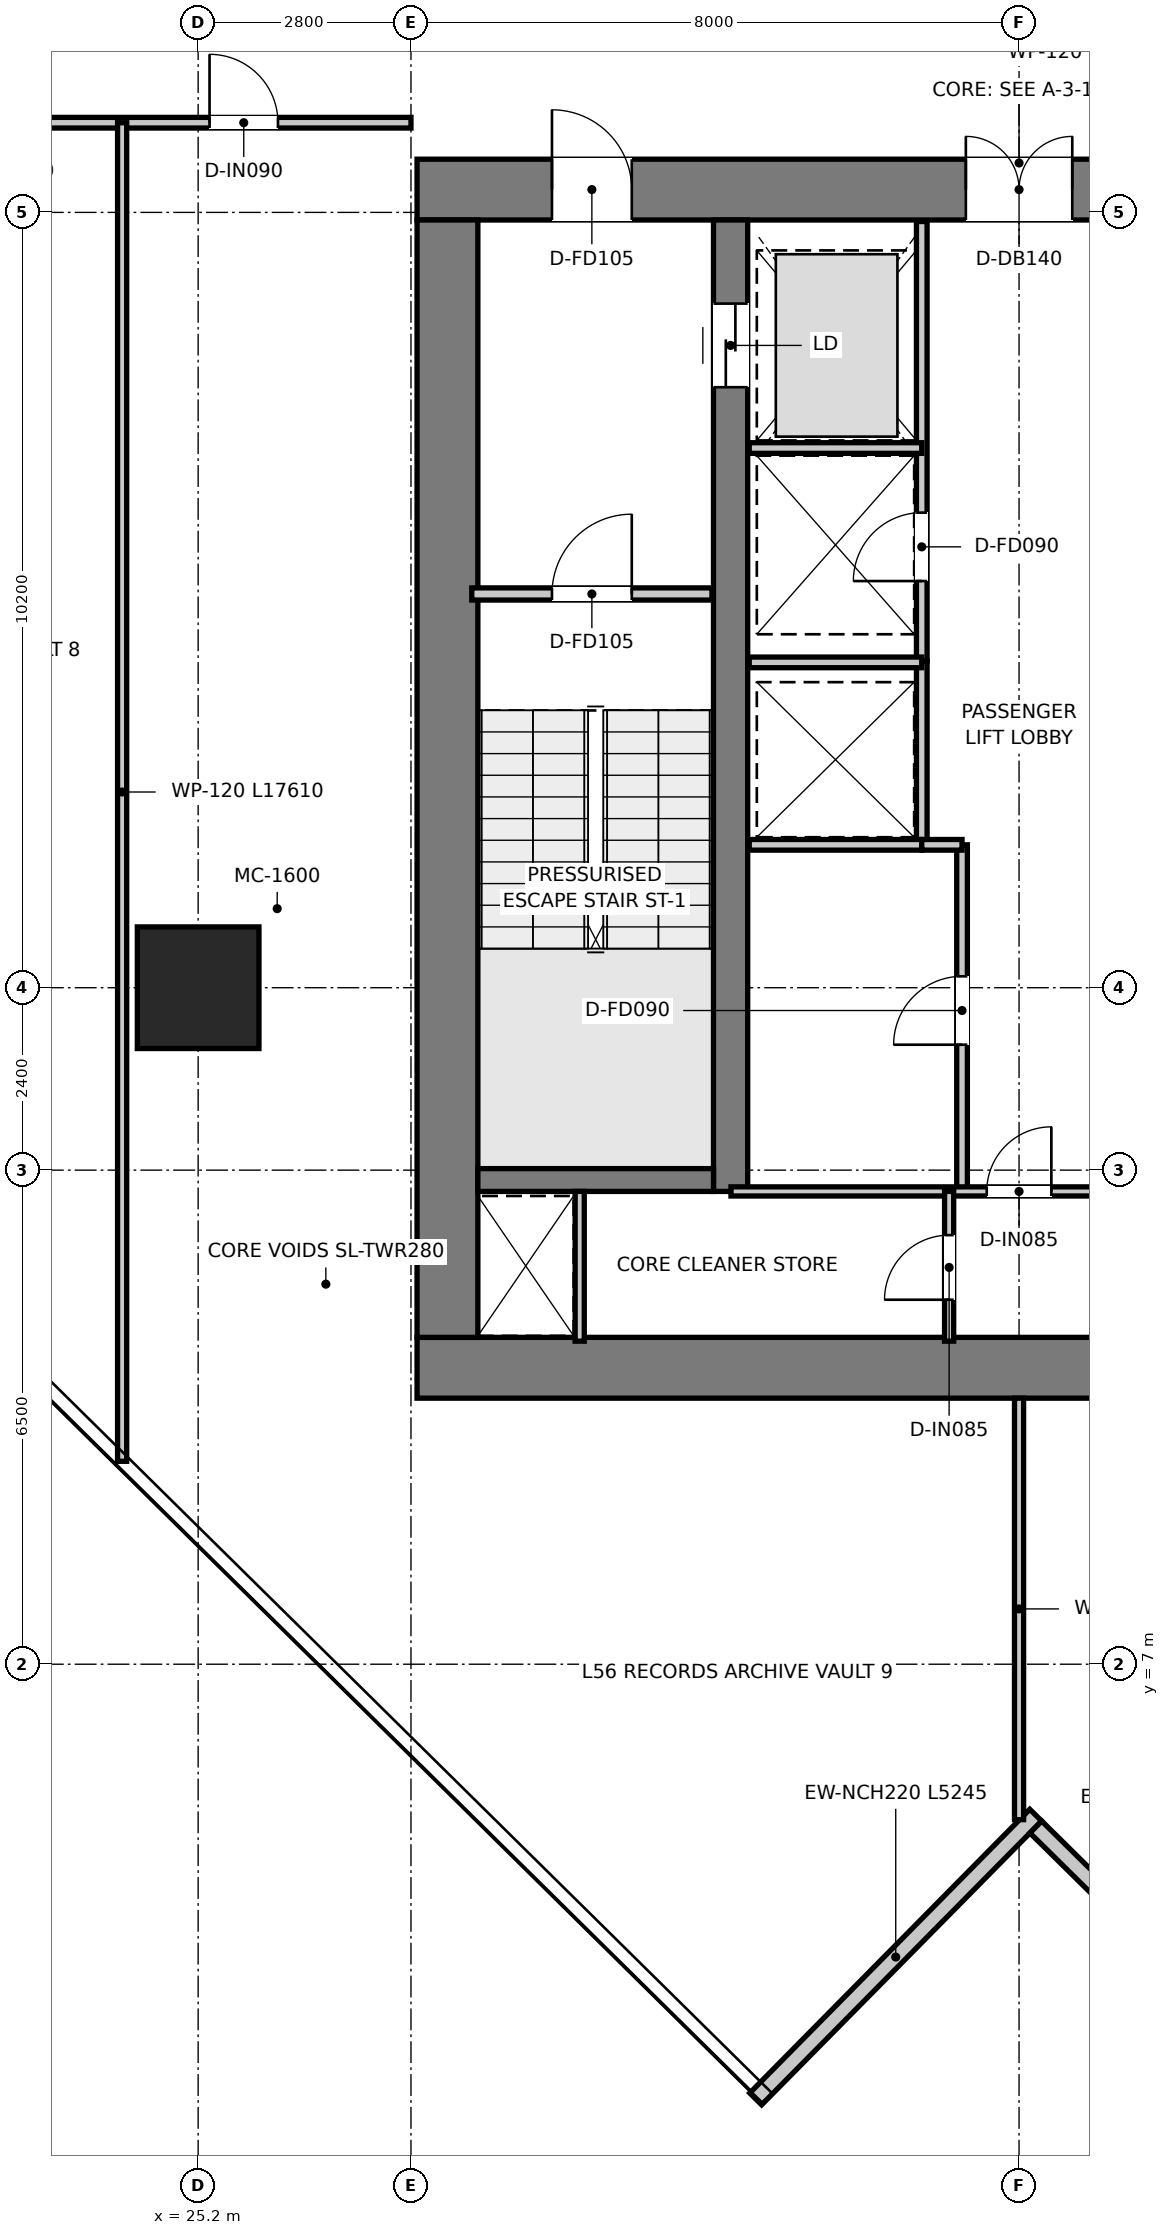
"""IFC4 building model, lengths in metres.
Left out: names, types, materials, properties, quantities, classifications, styles, units other than length and angle.
Written with IfcOpenShell. Run it as: python <this file> out.ifc"""

import sys

from ifc_helpers import new_model, si_unit, direction, frame, frame_2d, origin, origin_2d, place, context, subcontext, project, spatial, rectangle, extrude, source, transform, mapped, element, fill, save


model = new_model("IFC4")
c1 = context("Model", 3, precision=1e-05, world=origin(), true_north=direction((0.0, 1.0)))
c2 = subcontext(c1, "Body", "Model", "MODEL_VIEW")
j1 = project(units=[si_unit("LENGTHUNIT", "METRE"), si_unit("PLANEANGLEUNIT", "RADIAN")], contexts=[c1])
p1 = place(None, origin())
s1 = spatial("IfcSite", under=j1, at=p1, CompositionType="ELEMENT")
p2 = place(p1, origin())
s2 = spatial("IfcBuilding", under=s1, at=p2, CompositionType="ELEMENT")
p3 = place(p2, frame((0.0, 0.0, 231.0)))
s3 = spatial("IfcBuildingStorey", under=s2, at=p3, CompositionType="ELEMENT", Elevation=231.0)
p4 = place(p3, frame((28.08, 10.9, 0.0), z_axis=(0.0, 0.0, 1.0), x_axis=(1.0, 0.0, 0.0)))
e1 = element("IfcWall", 1, at=p4, inside=s3, PredefinedType="SHEAR", context=c2, shape_type="SweptSolid", body=[
    extrude(rectangle(XDim=15.84, YDim=0.8, at=frame_2d((7.92, 0.0))), origin(), (0.0, 0.0, 1.0), 3.95),
])
p5 = place(p3, frame((28.08, 26.4, 0.0), z_axis=(0.0, 0.0, 1.0), x_axis=(1.0, 0.0, 0.0)))
e2 = element("IfcWall", 2, at=p5, inside=s3, PredefinedType="SHEAR", context=c2, shape_type="SweptSolid", body=[
    extrude(rectangle(XDim=15.84, YDim=0.8, at=frame_2d((7.92, 0.0))), origin(), (0.0, 0.0, 1.0), 3.95),
])
p6 = place(p5, frame((7.22, 0.0, 0.0)))
e3 = element("IfcOpeningElement", 3, at=p6, cuts=e2, PredefinedType="OPENING", context=c2, shape_type="SweptSolid", body=[
    extrude(rectangle(XDim=1.4, YDim=2.2, at=frame_2d((0.7, 1.1))), frame((0.0, 0.41, 0.0), z_axis=(0.0, -1.0, 0.0), x_axis=(1.0, 0.0, 0.0)), (0.0, 0.0, 1.0), 0.82),
])
p7 = place(p5, frame((1.775, 0.0, 0.0)))
e4 = element("IfcOpeningElement", 4, at=p7, cuts=e2, PredefinedType="OPENING", context=c2, shape_type="SweptSolid", body=[
    extrude(rectangle(XDim=1.05, YDim=2.1, at=frame_2d((0.525, 1.05))), frame((0.0, 0.41, 0.0), z_axis=(0.0, -1.0, 0.0), x_axis=(1.0, 0.0, 0.0)), (0.0, 0.0, 1.0), 0.82),
])
p8 = place(p5, frame((13.015, 0.0, 0.0)))
e5 = element("IfcOpeningElement", 5, at=p8, cuts=e2, PredefinedType="OPENING", context=c2, shape_type="SweptSolid", body=[
    extrude(rectangle(XDim=1.05, YDim=2.1, at=frame_2d((0.525, 1.05))), frame((0.0, 0.41, 0.0), z_axis=(0.0, -1.0, 0.0), x_axis=(1.0, 0.0, 0.0)), (0.0, 0.0, 1.0), 0.82),
])
p9 = place(p3, frame((28.48, 11.3, 0.0), z_axis=(0.0, 0.0, 1.0), x_axis=(0.0, 1.0, 0.0)))
e6 = element("IfcWall", 6, at=p9, inside=s3, PredefinedType="SHEAR", context=c2, shape_type="SweptSolid", body=[
    extrude(rectangle(XDim=14.7, YDim=0.8, at=frame_2d((7.35, 0.0))), origin(), (0.0, 0.0, 1.0), 3.95),
])
p10 = place(p3, frame((32.205, 13.22, 0.0), z_axis=(0.0, 0.0, 1.0), x_axis=(0.0, 1.0, 0.0)))
e7 = element("IfcWall", 7, at=p10, inside=s3, PredefinedType="SHEAR", context=c2, shape_type="SweptSolid", body=[
    extrude(rectangle(XDim=12.78, YDim=0.45, at=frame_2d((6.39, 0.0))), origin(), (0.0, 0.0, 1.0), 3.95),
])
p11 = place(p10, frame((10.58, 0.0, 0.0)))
e8 = element("IfcOpeningElement", 8, at=p11, cuts=e7, PredefinedType="OPENING", context=c2, shape_type="SweptSolid", body=[
    extrude(rectangle(XDim=1.1, YDim=2.15, at=frame_2d((0.55, 1.075))), frame((0.0, 0.235, 0.0), z_axis=(0.0, -1.0, 0.0), x_axis=(1.0, 0.0, 0.0)), (0.0, 0.0, 1.0), 0.47),
])
p12 = place(p3, frame((28.88, 13.37, 0.0), z_axis=(0.0, 0.0, 1.0), x_axis=(1.0, 0.0, 0.0)))
e9 = element("IfcWall", 9, at=p12, inside=s3, PredefinedType="SHEAR", context=c2, shape_type="SweptSolid", body=[
    extrude(rectangle(XDim=3.1, YDim=0.3, at=frame_2d((1.55, 0.0))), origin(), (0.0, 0.0, 1.0), 3.95),
])
m1 = source(origin(), c2, "Body", "SweptSolid", [
    extrude(rectangle(XDim=1.6, YDim=1.6, at=origin_2d()), origin(), (0.0, 0.0, 1.0), 3.95),
])
p13 = place(p3, frame((25.2, 15.9, 0.0), z_axis=(0.0, 0.0, 1.0), x_axis=(1.0, 0.0, 0.0)))
e10 = element("IfcColumn", 10, at=p13, inside=s3, PredefinedType="USERDEFINED", context=c2, shape_type="MappedRepresentation", body=[
    mapped(m1, transform((0.0, 0.0, 0.0), x_axis=(1.0, 0.0, 0.0), y_axis=(0.0, 1.0, 0.0), z_axis=(0.0, 0.0, 1.0), scale=1.0)),
])
p14 = place(p3, frame((32.535, 1.281, 0.0), z_axis=(0.0, 0.0, 1.0), x_axis=(0.702460059039, 0.711723166305, 0.0)))
e11 = element("IfcWall", 11, at=p14, inside=s3, PredefinedType="ELEMENTEDWALL", context=c2, shape_type="SweptSolid", body=[
    extrude(rectangle(XDim=5.245, YDim=0.22, at=frame_2d((2.623, 0.0))), origin(), (0.0, 0.0, 1.0), 3.67),
])
p15 = place(p3, frame((36.221, 4.858, 0.0), z_axis=(0.0, 0.0, 1.0), x_axis=(0.711731489292, -0.702451626199, 0.0)))
e12 = element("IfcWall", 12, at=p15, inside=s3, PredefinedType="ELEMENTEDWALL", context=c2, shape_type="SweptSolid", body=[
    extrude(rectangle(XDim=5.025, YDim=0.22, at=frame_2d((2.512, 0.0))), origin(), (0.0, 0.0, 1.0), 3.67),
])
p16 = place(p3, frame((28.8, 21.08, 0.0), z_axis=(0.0, 0.0, 1.0), x_axis=(1.0, 0.0, 0.0)))
e13 = element("IfcWall", 13, at=p16, inside=s3, PredefinedType="PARTITIONING", context=c2, shape_type="SweptSolid", body=[
    extrude(rectangle(XDim=3.16, YDim=0.16, at=frame_2d((1.58, 0.0))), origin(), (0.0, 0.0, 1.0), 3.67),
])
p17 = place(p16, frame((1.055, 0.0, 0.0)))
e14 = element("IfcOpeningElement", 14, at=p17, cuts=e13, PredefinedType="OPENING", context=c2, shape_type="SweptSolid", body=[
    extrude(rectangle(XDim=1.05, YDim=2.1, at=frame_2d((0.525, 1.05))), frame((0.0, 0.09, 0.0), z_axis=(0.0, -1.0, 0.0), x_axis=(1.0, 0.0, 0.0)), (0.0, 0.0, 1.0), 0.18),
])
p18 = place(p3, frame((34.72, 20.2, 0.0), z_axis=(0.0, 0.0, 1.0), x_axis=(0.0, 1.0, 0.0)))
e15 = element("IfcWall", 15, at=p18, inside=s3, PredefinedType="PARTITIONING", context=c2, shape_type="SweptSolid", body=[
    extrude(rectangle(XDim=5.78, YDim=0.14, at=frame_2d((2.89, 0.0))), origin(), (0.0, 0.0, 1.0), 2.67),
])
p19 = place(p18, frame((1.05, 0.0, 0.0)))
e16 = element("IfcOpeningElement", 16, at=p19, cuts=e15, PredefinedType="OPENING", context=c2, shape_type="SweptSolid", body=[
    extrude(rectangle(XDim=0.9, YDim=2.1, at=frame_2d((0.45, 1.05))), frame((0.0, 0.08, 0.0), z_axis=(0.0, -1.0, 0.0), x_axis=(1.0, 0.0, 0.0)), (0.0, 0.0, 1.0), 0.16),
])
p20 = place(p3, frame((32.45, 23.0, 0.0), z_axis=(0.0, 0.0, 1.0), x_axis=(1.0, 0.0, 0.0)))
e17 = element("IfcWall", 17, at=p20, inside=s3, PredefinedType="PARTITIONING", context=c2, shape_type="SweptSolid", body=[
    extrude(rectangle(XDim=2.27, YDim=0.14, at=frame_2d((1.135, 0.0))), origin(), (0.0, 0.0, 1.0), 2.67),
])
p21 = place(p3, frame((34.72, 17.78, 0.0), z_axis=(0.0, 0.0, 1.0), x_axis=(0.0, 1.0, 0.0)))
e18 = element("IfcWall", 18, at=p21, inside=s3, PredefinedType="PARTITIONING", context=c2, shape_type="SweptSolid", body=[
    extrude(rectangle(XDim=2.42, YDim=0.14, at=frame_2d((1.21, 0.0))), origin(), (0.0, 0.0, 1.0), 3.67),
])
for number, where, z_axis, x_axis in (
    (19, (32.45, 17.78, 0.0), (0.0, 0.0, 1.0), (1.0, 0.0, 0.0)),
    (20, (32.45, 20.18, 0.0), (0.0, 0.0, 1.0), (1.0, 0.0, 0.0)),
):
    element("IfcWall", number, at=place(p3, frame(where, z_axis=z_axis, x_axis=x_axis)), inside=s3, PredefinedType="PARTITIONING", context=c2, shape_type="SweptSolid", body=[
        extrude(rectangle(XDim=2.27, YDim=0.14, at=frame_2d((1.135, 0.0))), origin(), (0.0, 0.0, 1.0), 3.67),
    ])
p22 = place(p3, frame((35.25, 13.22, 0.0), z_axis=(0.0, 0.0, 1.0), x_axis=(0.0, 1.0, 0.0)))
e21 = element("IfcWall", 21, at=p22, inside=s3, PredefinedType="PARTITIONING", context=c2, shape_type="SweptSolid", body=[
    extrude(rectangle(XDim=4.56, YDim=0.14, at=frame_2d((2.28, 0.0))), origin(), (0.0, 0.0, 1.0), 3.67),
])
p23 = place(p22, frame((1.93, 0.0, 0.0)))
e22 = element("IfcOpeningElement", 22, at=p23, cuts=e21, PredefinedType="OPENING", context=c2, shape_type="SweptSolid", body=[
    extrude(rectangle(XDim=0.9, YDim=2.1, at=frame_2d((0.45, 1.05))), frame((0.0, 0.08, 0.0), z_axis=(0.0, -1.0, 0.0), x_axis=(1.0, 0.0, 0.0)), (0.0, 0.0, 1.0), 0.16),
])
p24 = place(p3, frame((34.72, 17.78, 0.0), z_axis=(0.0, 0.0, 1.0), x_axis=(1.0, 0.0, 0.0)))
e23 = element("IfcWall", 23, at=p24, inside=s3, PredefinedType="PARTITIONING", context=c2, shape_type="SweptSolid", body=[
    extrude(rectangle(XDim=0.53, YDim=0.14, at=frame_2d((0.265, 0.0))), origin(), (0.0, 0.0, 1.0), 3.67),
])
p25 = place(p3, frame((30.22, 11.25, 0.0), z_axis=(0.0, 0.0, 1.0), x_axis=(0.0, 1.0, 0.0)))
e24 = element("IfcWall", 24, at=p25, inside=s3, PredefinedType="PARTITIONING", context=c2, shape_type="SweptSolid", body=[
    extrude(rectangle(XDim=1.97, YDim=0.12, at=frame_2d((0.985, 0.0))), origin(), (0.0, 0.0, 1.0), 3.67),
])
p26 = place(p3, frame((32.21, 13.22, 0.0), z_axis=(0.0, 0.0, 1.0), x_axis=(1.0, 0.0, 0.0)))
e25 = element("IfcWall", 25, at=p26, inside=s3, PredefinedType="PARTITIONING", context=c2, shape_type="SweptSolid", body=[
    extrude(rectangle(XDim=7.58, YDim=0.12, at=frame_2d((3.79, 0.0))), origin(), (0.0, 0.0, 1.0), 3.67),
])
p27 = place(p26, frame((3.365, 0.0, 0.0)))
e26 = element("IfcOpeningElement", 26, at=p27, cuts=e25, PredefinedType="OPENING", context=c2, shape_type="SweptSolid", body=[
    extrude(rectangle(XDim=0.85, YDim=2.1, at=frame_2d((0.425, 1.05))), frame((0.0, 0.07, 0.0), z_axis=(0.0, -1.0, 0.0), x_axis=(1.0, 0.0, 0.0)), (0.0, 0.0, 1.0), 0.14),
])
p28 = place(p3, frame((35.08, 11.25, 0.0), z_axis=(0.0, 0.0, 1.0), x_axis=(0.0, 1.0, 0.0)))
e27 = element("IfcWall", 27, at=p28, inside=s3, PredefinedType="PARTITIONING", context=c2, shape_type="SweptSolid", body=[
    extrude(rectangle(XDim=1.97, YDim=0.12, at=frame_2d((0.985, 0.0))), origin(), (0.0, 0.0, 1.0), 3.67),
])
p29 = place(p28, frame((0.545, 0.0, 0.0)))
e28 = element("IfcOpeningElement", 28, at=p29, cuts=e27, PredefinedType="OPENING", context=c2, shape_type="SweptSolid", body=[
    extrude(rectangle(XDim=0.85, YDim=2.1, at=frame_2d((0.425, 1.05))), frame((0.0, 0.07, 0.0), z_axis=(0.0, -1.0, 0.0), x_axis=(1.0, 0.0, 0.0)), (0.0, 0.0, 1.0), 0.14),
])
p30 = place(p3, frame((13.667, 27.28, 0.0), z_axis=(0.0, 0.0, 1.0), x_axis=(1.0, 0.0, 0.0)))
e29 = element("IfcWall", 29, at=p30, inside=s3, PredefinedType="PARTITIONING", context=c2, shape_type="SweptSolid", body=[
    extrude(rectangle(XDim=14.333, YDim=0.14, at=frame_2d((7.166, 0.0))), origin(), (0.0, 0.0, 1.0), 3.03),
])
p31 = place(p30, frame((1.198, 0.0, 0.0)))
e30 = element("IfcOpeningElement", 30, at=p31, cuts=e29, PredefinedType="OPENING", context=c2, shape_type="SweptSolid", body=[
    extrude(rectangle(XDim=0.9, YDim=2.1, at=frame_2d((0.45, 1.05))), frame((0.0, 0.08, 0.0), z_axis=(0.0, -1.0, 0.0), x_axis=(1.0, 0.0, 0.0)), (0.0, 0.0, 1.0), 0.16),
])
p32 = place(p30, frame((8.683, 0.0, 0.0)))
e31 = element("IfcOpeningElement", 31, at=p32, cuts=e29, PredefinedType="OPENING", context=c2, shape_type="SweptSolid", body=[
    extrude(rectangle(XDim=0.9, YDim=2.1, at=frame_2d((0.45, 1.05))), frame((0.0, 0.08, 0.0), z_axis=(0.0, -1.0, 0.0), x_axis=(1.0, 0.0, 0.0)), (0.0, 0.0, 1.0), 0.16),
])
p33 = place(p30, frame((11.683, 0.0, 0.0)))
e32 = element("IfcOpeningElement", 32, at=p33, cuts=e29, PredefinedType="OPENING", context=c2, shape_type="SweptSolid", body=[
    extrude(rectangle(XDim=0.9, YDim=2.1, at=frame_2d((0.45, 1.05))), frame((0.0, 0.08, 0.0), z_axis=(0.0, -1.0, 0.0), x_axis=(1.0, 0.0, 0.0)), (0.0, 0.0, 1.0), 0.16),
])
p34 = place(p3, frame((36.0, 4.955, 0.0), z_axis=(0.0, 0.0, 1.0), x_axis=(0.0, 1.0, 0.0)))
e33 = element("IfcWall", 33, at=p34, inside=s3, PredefinedType="PARTITIONING", context=c2, shape_type="SweptSolid", body=[
    extrude(rectangle(XDim=5.545, YDim=0.12, at=frame_2d((2.772, 0.0))), origin(), (0.0, 0.0, 1.0), 3.67),
])
p35 = place(p3, frame((24.2, 9.669, 0.0), z_axis=(0.0, 0.0, 1.0), x_axis=(0.0, 1.0, 0.0)))
e34 = element("IfcWall", 34, at=p35, inside=s3, PredefinedType="PARTITIONING", context=c2, shape_type="SweptSolid", body=[
    extrude(rectangle(XDim=17.611, YDim=0.12, at=frame_2d((8.805, 0.0))), origin(), (0.0, 0.0, 1.0), 3.18),
])
p36 = place(p17, origin())
e35 = element("IfcDoor", 35, at=p36, inside=s3, OperationType="SINGLE_SWING_RIGHT", PredefinedType="DOOR", context=c2, shape_type="SweptSolid", body=[
    extrude(rectangle(XDim=1.05, YDim=2.1, at=frame_2d((0.525, 1.05))), frame((0.0, 0.025, 0.0), z_axis=(0.0, -1.0, 0.0), x_axis=(1.0, 0.0, 0.0)), (0.0, 0.0, 1.0), 0.05),
])
fill(e14, e35)
p37 = place(p6, origin())
e36 = element("IfcDoor", 36, at=p37, inside=s3, OperationType="DOUBLE_DOOR_SINGLE_SWING", PredefinedType="DOOR", context=c2, shape_type="SweptSolid", body=[
    extrude(rectangle(XDim=1.4, YDim=2.2, at=frame_2d((0.7, 1.1))), frame((0.0, 0.025, 0.0), z_axis=(0.0, -1.0, 0.0), x_axis=(1.0, 0.0, 0.0)), (0.0, 0.0, 1.0), 0.05),
])
fill(e3, e36)
p38 = place(p7, origin())
e37 = element("IfcDoor", 37, at=p38, inside=s3, OperationType="SINGLE_SWING_LEFT", PredefinedType="DOOR", context=c2, shape_type="SweptSolid", body=[
    extrude(rectangle(XDim=1.05, YDim=2.1, at=frame_2d((0.525, 1.05))), frame((0.0, 0.025, 0.0), z_axis=(0.0, -1.0, 0.0), x_axis=(1.0, 0.0, 0.0)), (0.0, 0.0, 1.0), 0.05),
])
fill(e4, e37)
p39 = place(p11, origin())
e38 = element("IfcDoor", 38, at=p39, inside=s3, OperationType="DOUBLE_DOOR_SLIDING", PredefinedType="DOOR", context=c2, shape_type="SweptSolid", body=[
    extrude(rectangle(XDim=1.1, YDim=2.15, at=frame_2d((0.55, 1.075))), frame((0.0, 0.025, 0.0), z_axis=(0.0, -1.0, 0.0), x_axis=(1.0, 0.0, 0.0)), (0.0, 0.0, 1.0), 0.05),
])
fill(e8, e38)
p40 = place(p19, origin())
e39 = element("IfcDoor", 39, at=p40, inside=s3, OperationType="SINGLE_SWING_LEFT", PredefinedType="DOOR", context=c2, shape_type="SweptSolid", body=[
    extrude(rectangle(XDim=0.9, YDim=2.1, at=frame_2d((0.45, 1.05))), frame((0.0, 0.025, 0.0), z_axis=(0.0, -1.0, 0.0), x_axis=(1.0, 0.0, 0.0)), (0.0, 0.0, 1.0), 0.05),
])
fill(e16, e39)
p41 = place(p23, origin())
e40 = element("IfcDoor", 40, at=p41, inside=s3, OperationType="SINGLE_SWING_LEFT", PredefinedType="DOOR", context=c2, shape_type="SweptSolid", body=[
    extrude(rectangle(XDim=0.9, YDim=2.1, at=frame_2d((0.45, 1.05))), frame((0.0, 0.025, 0.0), z_axis=(0.0, -1.0, 0.0), x_axis=(1.0, 0.0, 0.0)), (0.0, 0.0, 1.0), 0.05),
])
fill(e22, e40)
p42 = place(p27, origin())
e41 = element("IfcDoor", 41, at=p42, inside=s3, OperationType="SINGLE_SWING_RIGHT", PredefinedType="DOOR", context=c2, shape_type="SweptSolid", body=[
    extrude(rectangle(XDim=0.85, YDim=2.1, at=frame_2d((0.425, 1.05))), frame((0.0, 0.025, 0.0), z_axis=(0.0, -1.0, 0.0), x_axis=(1.0, 0.0, 0.0)), (0.0, 0.0, 1.0), 0.05),
])
fill(e26, e41)
p43 = place(p29, origin())
e42 = element("IfcDoor", 42, at=p43, inside=s3, OperationType="SINGLE_SWING_LEFT", PredefinedType="DOOR", context=c2, shape_type="SweptSolid", body=[
    extrude(rectangle(XDim=0.85, YDim=2.1, at=frame_2d((0.425, 1.05))), frame((0.0, 0.025, 0.0), z_axis=(0.0, -1.0, 0.0), x_axis=(1.0, 0.0, 0.0)), (0.0, 0.0, 1.0), 0.05),
])
fill(e28, e42)
p44 = place(p33, origin())
e43 = element("IfcDoor", 43, at=p44, inside=s3, OperationType="SINGLE_SWING_LEFT", PredefinedType="DOOR", context=c2, shape_type="SweptSolid", body=[
    extrude(rectangle(XDim=0.9, YDim=2.1, at=frame_2d((0.45, 1.05))), frame((0.0, 0.025, 0.0), z_axis=(0.0, -1.0, 0.0), x_axis=(1.0, 0.0, 0.0)), (0.0, 0.0, 1.0), 0.05),
])
fill(e32, e43)
save(model, sys.argv[1])
